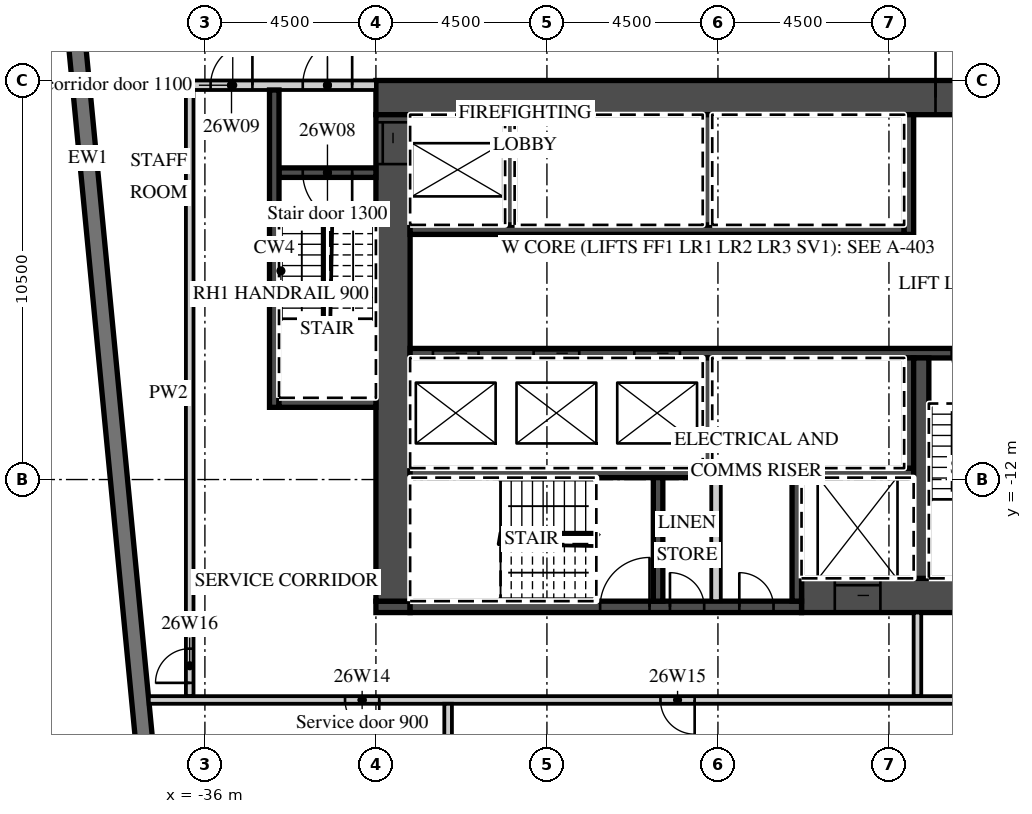
"""IFC4 building model, lengths in metres.
Left out: names, types, materials, properties, quantities, classifications, styles, units other than length and angle.
Written with IfcOpenShell. Run it as: python <this file> out.ifc"""

import sys

from ifc_helpers import new_model, si_unit, direction, frame, frame_2d, origin, place, context, subcontext, project, spatial, rectangle, extrude, element, fill, save


model = new_model("IFC4")
c1 = context("Model", 3, precision=1e-05, world=origin(), true_north=direction((0.0, 1.0)))
c2 = subcontext(c1, "Body", "Model", "MODEL_VIEW")
j1 = project(units=[si_unit("LENGTHUNIT", "METRE"), si_unit("PLANEANGLEUNIT", "RADIAN")], contexts=[c1])
p1 = place(None, origin())
s1 = spatial("IfcSite", under=j1, at=p1, CompositionType="ELEMENT")
p2 = place(p1, origin())
s2 = spatial("IfcBuilding", under=s1, at=p2, CompositionType="ELEMENT")
p3 = place(p2, frame((0.0, 0.0, 120.7)))
s3 = spatial("IfcBuildingStorey", under=s2, at=p3, CompositionType="ELEMENT", Elevation=120.7)
p4 = place(p3, frame((-40.753, 13.872, 0.0), z_axis=(0.0, 0.0, 1.0), x_axis=(0.095843327381, -0.995396431878, 0.0)))
e1 = element("IfcWall", 1, at=p4, inside=s3, PredefinedType="SOLIDWALL", context=c2, shape_type="SweptSolid", body=[
    extrude(rectangle(XDim=35.0, YDim=0.45, at=frame_2d((17.5, 0.0))), origin(), (0.0, 0.0, 1.0), 3.02),
])
p5 = place(p4, frame((4.277, 0.0, 0.45)))
e2 = element("IfcOpeningElement", 2, at=p5, cuts=e1, PredefinedType="OPENING", context=c2, shape_type="SweptSolid", body=[
    extrude(rectangle(XDim=3.3, YDim=2.25, at=frame_2d((1.65, 1.125))), frame((0.0, 0.235, 0.0), z_axis=(0.0, -1.0, 0.0), x_axis=(1.0, 0.0, 0.0)), (0.0, 0.0, 1.0), 0.47),
])
p6 = place(p4, frame((8.798, 0.0, 0.45)))
e3 = element("IfcOpeningElement", 3, at=p6, cuts=e1, PredefinedType="OPENING", context=c2, shape_type="SweptSolid", body=[
    extrude(rectangle(XDim=3.3, YDim=2.25, at=frame_2d((1.65, 1.125))), frame((0.0, 0.235, 0.0), z_axis=(0.0, -1.0, 0.0), x_axis=(1.0, 0.0, 0.0)), (0.0, 0.0, 1.0), 0.47),
])
p7 = place(p3, frame((-31.5, -1.95, 0.0), z_axis=(0.0, 0.0, 1.0), x_axis=(1.0, 0.0, 0.0)))
e4 = element("IfcWall", 4, at=p7, inside=s3, PredefinedType="SHEAR", context=c2, shape_type="SweptSolid", body=[
    extrude(rectangle(XDim=18.0, YDim=0.9, at=frame_2d((9.0, 0.0))), origin(), (0.0, 0.0, 1.0), 3.02),
])
p8 = place(p7, frame((14.725, 0.0, 0.0)))
e5 = element("IfcOpeningElement", 5, at=p8, cuts=e4, PredefinedType="OPENING", context=c2, shape_type="SweptSolid", body=[
    extrude(rectangle(XDim=1.8, YDim=2.1, at=frame_2d((0.9, 1.05))), frame((0.0, 0.46, 0.0), z_axis=(0.0, -1.0, 0.0), x_axis=(1.0, 0.0, 0.0)), (0.0, 0.0, 1.0), 0.92),
])
p9 = place(p3, frame((-20.3, -15.05, 0.0), z_axis=(0.0, 0.0, 1.0), x_axis=(1.0, 0.0, 0.0)))
e6 = element("IfcWall", 6, at=p9, inside=s3, PredefinedType="SHEAR", context=c2, shape_type="SweptSolid", body=[
    extrude(rectangle(XDim=6.8, YDim=0.9, at=frame_2d((3.4, 0.0))), origin(), (0.0, 0.0, 1.0), 3.02),
])
p10 = place(p9, frame((0.875, 0.0, 0.0)))
e7 = element("IfcOpeningElement", 7, at=p10, cuts=e6, PredefinedType="OPENING", context=c2, shape_type="SweptSolid", body=[
    extrude(rectangle(XDim=1.2, YDim=2.1, at=frame_2d((0.6, 1.05))), frame((0.0, 0.46, 0.0), z_axis=(0.0, -1.0, 0.0), x_axis=(1.0, 0.0, 0.0)), (0.0, 0.0, 1.0), 0.92),
])
p11 = place(p3, frame((-31.5, -15.35, 0.0), z_axis=(0.0, 0.0, 1.0), x_axis=(1.0, 0.0, 0.0)))
e8 = element("IfcWall", 8, at=p11, inside=s3, PredefinedType="SHEAR", context=c2, shape_type="SweptSolid", body=[
    extrude(rectangle(XDim=0.9, YDim=0.3, at=frame_2d((0.45, 0.0))), origin(), (0.0, 0.0, 1.0), 3.02),
])
p12 = place(p3, frame((-30.6, -15.35, 0.0), z_axis=(0.0, 0.0, 1.0), x_axis=(1.0, 0.0, 0.0)))
e9 = element("IfcWall", 9, at=p12, inside=s3, PredefinedType="SHEAR", context=c2, shape_type="SweptSolid", body=[
    extrude(rectangle(XDim=10.3, YDim=0.3, at=frame_2d((5.15, 0.0))), origin(), (0.0, 0.0, 1.0), 3.02),
])
p13 = place(p12, frame((5.0, 0.0, 0.0)))
e10 = element("IfcOpeningElement", 10, at=p13, cuts=e9, PredefinedType="OPENING", context=c2, shape_type="SweptSolid", body=[
    extrude(rectangle(XDim=1.3, YDim=2.1, at=frame_2d((0.65, 1.05))), frame((0.0, 0.16, 0.0), z_axis=(0.0, -1.0, 0.0), x_axis=(1.0, 0.0, 0.0)), (0.0, 0.0, 1.0), 0.32),
])
p14 = place(p12, frame((6.837, 0.0, 0.0)))
e11 = element("IfcOpeningElement", 11, at=p14, cuts=e9, PredefinedType="OPENING", context=c2, shape_type="SweptSolid", body=[
    extrude(rectangle(XDim=0.9, YDim=2.1, at=frame_2d((0.45, 1.05))), frame((0.0, 0.16, 0.0), z_axis=(0.0, -1.0, 0.0), x_axis=(1.0, 0.0, 0.0)), (0.0, 0.0, 1.0), 0.32),
])
p15 = place(p12, frame((8.663, 0.0, 0.0)))
e12 = element("IfcOpeningElement", 12, at=p15, cuts=e9, PredefinedType="OPENING", context=c2, shape_type="SweptSolid", body=[
    extrude(rectangle(XDim=0.9, YDim=2.1, at=frame_2d((0.45, 1.05))), frame((0.0, 0.16, 0.0), z_axis=(0.0, -1.0, 0.0), x_axis=(1.0, 0.0, 0.0)), (0.0, 0.0, 1.0), 0.32),
])
p16 = place(p3, frame((-31.05, -15.2, 0.0), z_axis=(0.0, 0.0, 1.0), x_axis=(0.0, 1.0, 0.0)))
e13 = element("IfcWall", 13, at=p16, inside=s3, PredefinedType="SHEAR", context=c2, shape_type="SweptSolid", body=[
    extrude(rectangle(XDim=12.8, YDim=0.9, at=frame_2d((6.4, 0.0))), origin(), (0.0, 0.0, 1.0), 3.02),
])
p17 = place(p16, frame((11.5, 0.0, 0.0)))
e14 = element("IfcOpeningElement", 14, at=p17, cuts=e13, PredefinedType="OPENING", context=c2, shape_type="SweptSolid", body=[
    extrude(rectangle(XDim=1.1, YDim=2.1, at=frame_2d((0.55, 1.05))), frame((0.0, 0.46, 0.0), z_axis=(0.0, -1.0, 0.0), x_axis=(1.0, 0.0, 0.0)), (0.0, 0.0, 1.0), 0.92),
])
p18 = place(p3, frame((-30.6, -5.425, 0.0), z_axis=(0.0, 0.0, 1.0), x_axis=(1.0, 0.0, 0.0)))
e15 = element("IfcWall", 15, at=p18, inside=s3, PredefinedType="SHEAR", context=c2, shape_type="SweptSolid", body=[
    extrude(rectangle(XDim=13.0, YDim=0.25, at=frame_2d((6.5, 0.0))), origin(), (0.0, 0.0, 1.0), 3.02),
])
p19 = place(p3, frame((-17.475, -5.55, 0.0), z_axis=(0.0, 0.0, 1.0), x_axis=(0.0, 1.0, 0.0)))
e16 = element("IfcWall", 16, at=p19, inside=s3, PredefinedType="SHEAR", context=c2, shape_type="SweptSolid", body=[
    extrude(rectangle(XDim=3.15, YDim=0.25, at=frame_2d((1.575, 0.0))), origin(), (0.0, 0.0, 1.0), 3.02),
])
for number, where, z_axis, x_axis in (
    (17, (-27.975, -5.3, 0.0), (0.0, 0.0, 1.0), (0.0, 1.0, 0.0)),
    (18, (-22.775, -5.3, 0.0), (0.0, 0.0, 1.0), (0.0, 1.0, 0.0)),
):
    element("IfcWall", number, at=place(p3, frame(where, z_axis=z_axis, x_axis=x_axis)), inside=s3, PredefinedType="SHEAR", context=c2, shape_type="SweptSolid", body=[
        extrude(rectangle(XDim=2.9, YDim=0.25, at=frame_2d((1.45, 0.0))), origin(), (0.0, 0.0, 1.0), 3.02),
    ])
p20 = place(p3, frame((-30.6, -8.675, 0.0), z_axis=(0.0, 0.0, 1.0), x_axis=(1.0, 0.0, 0.0)))
e19 = element("IfcWall", 19, at=p20, inside=s3, PredefinedType="SHEAR", context=c2, shape_type="SweptSolid", body=[
    extrude(rectangle(XDim=16.2, YDim=0.25, at=frame_2d((8.1, 0.0))), origin(), (0.0, 0.0, 1.0), 3.02),
])
p21 = place(p20, frame((0.6, 0.0, 0.0)))
e20 = element("IfcOpeningElement", 20, at=p21, cuts=e19, PredefinedType="OPENING", context=c2, shape_type="SweptSolid", body=[
    extrude(rectangle(XDim=1.2, YDim=2.1, at=frame_2d((0.6, 1.05))), frame((0.0, 0.135, 0.0), z_axis=(0.0, -1.0, 0.0), x_axis=(1.0, 0.0, 0.0)), (0.0, 0.0, 1.0), 0.27),
])
p22 = place(p20, frame((3.25, 0.0, 0.0)))
e21 = element("IfcOpeningElement", 21, at=p22, cuts=e19, PredefinedType="OPENING", context=c2, shape_type="SweptSolid", body=[
    extrude(rectangle(XDim=1.2, YDim=2.1, at=frame_2d((0.6, 1.05))), frame((0.0, 0.135, 0.0), z_axis=(0.0, -1.0, 0.0), x_axis=(1.0, 0.0, 0.0)), (0.0, 0.0, 1.0), 0.27),
])
p23 = place(p20, frame((5.9, 0.0, 0.0)))
e22 = element("IfcOpeningElement", 22, at=p23, cuts=e19, PredefinedType="OPENING", context=c2, shape_type="SweptSolid", body=[
    extrude(rectangle(XDim=1.2, YDim=2.1, at=frame_2d((0.6, 1.05))), frame((0.0, 0.135, 0.0), z_axis=(0.0, -1.0, 0.0), x_axis=(1.0, 0.0, 0.0)), (0.0, 0.0, 1.0), 0.27),
])
p24 = place(p20, frame((14.25, 0.0, 0.0)))
e23 = element("IfcOpeningElement", 23, at=p24, cuts=e19, PredefinedType="OPENING", context=c2, shape_type="SweptSolid", body=[
    extrude(rectangle(XDim=1.3, YDim=2.1, at=frame_2d((0.65, 1.05))), frame((0.0, 0.135, 0.0), z_axis=(0.0, -1.0, 0.0), x_axis=(1.0, 0.0, 0.0)), (0.0, 0.0, 1.0), 0.27),
])
p25 = place(p3, frame((-30.6, -11.825, 0.0), z_axis=(0.0, 0.0, 1.0), x_axis=(1.0, 0.0, 0.0)))
e24 = element("IfcWall", 24, at=p25, inside=s3, PredefinedType="SHEAR", context=c2, shape_type="SweptSolid", body=[
    extrude(rectangle(XDim=13.25, YDim=0.25, at=frame_2d((6.625, 0.0))), origin(), (0.0, 0.0, 1.0), 3.02),
])
for number, where, z_axis, x_axis in (
    (25, (-17.475, -11.7, 0.0), (0.0, 0.0, 1.0), (0.0, 1.0, 0.0)),
    (26, (-22.775, -11.7, 0.0), (0.0, 0.0, 1.0), (0.0, 1.0, 0.0)),
):
    element("IfcWall", number, at=place(p3, frame(where, z_axis=z_axis, x_axis=x_axis)), inside=s3, PredefinedType="SHEAR", context=c2, shape_type="SweptSolid", body=[
        extrude(rectangle(XDim=2.9, YDim=0.25, at=frame_2d((1.45, 0.0))), origin(), (0.0, 0.0, 1.0), 3.02),
    ])
p26 = place(p3, frame((-17.15, -14.6, 0.0), z_axis=(0.0, 0.0, 1.0), x_axis=(0.0, 1.0, 0.0)))
e27 = element("IfcWall", 27, at=p26, inside=s3, PredefinedType="SHEAR", context=c2, shape_type="SweptSolid", body=[
    extrude(rectangle(XDim=5.8, YDim=0.4, at=frame_2d((2.9, 0.0))), origin(), (0.0, 0.0, 1.0), 3.02),
])
for number, where, z_axis, x_axis in (
    (28, (-20.425, -15.2, 0.0), (0.0, 0.0, 1.0), (0.0, 1.0, 0.0)),
    (29, (-24.075, -15.2, 0.0), (0.0, 0.0, 1.0), (0.0, 1.0, 0.0)),
):
    element("IfcWall", number, at=place(p3, frame(where, z_axis=z_axis, x_axis=x_axis)), inside=s3, PredefinedType="SHEAR", context=c2, shape_type="SweptSolid", body=[
        extrude(rectangle(XDim=3.25, YDim=0.25, at=frame_2d((1.625, 0.0))), origin(), (0.0, 0.0, 1.0), 3.02),
    ])
p27 = place(p3, frame((-22.55, -15.2, 0.0), z_axis=(0.0, 0.0, 1.0), x_axis=(0.0, 1.0, 0.0)))
e30 = element("IfcWall", 30, at=p27, inside=s3, PredefinedType="PARTITIONING", context=c2, shape_type="SweptSolid", body=[
    extrude(rectangle(XDim=3.25, YDim=0.25, at=frame_2d((1.625, 0.0))), origin(), (0.0, 0.0, 1.0), 3.02),
])
p28 = place(p3, frame((-39.035, -1.625, 0.0), z_axis=(0.0, 0.0, 1.0), x_axis=(1.0, 0.0, 0.0)))
e31 = element("IfcWall", 31, at=p28, inside=s3, PredefinedType="PARTITIONING", context=c2, shape_type="SweptSolid", body=[
    extrude(rectangle(XDim=7.535, YDim=0.25, at=frame_2d((3.768, 0.0))), origin(), (0.0, 0.0, 1.0), 3.02),
])
p29 = place(p28, frame((5.61, 0.0, 0.0)))
e32 = element("IfcOpeningElement", 32, at=p29, cuts=e31, PredefinedType="OPENING", context=c2, shape_type="SweptSolid", body=[
    extrude(rectangle(XDim=1.3, YDim=2.1, at=frame_2d((0.65, 1.05))), frame((0.0, 0.135, 0.0), z_axis=(0.0, -1.0, 0.0), x_axis=(1.0, 0.0, 0.0)), (0.0, 0.0, 1.0), 0.27),
])
p30 = place(p28, frame((3.185, 0.0, 0.0)))
e33 = element("IfcOpeningElement", 33, at=p30, cuts=e31, PredefinedType="OPENING", context=c2, shape_type="SweptSolid", body=[
    extrude(rectangle(XDim=1.1, YDim=2.1, at=frame_2d((0.55, 1.05))), frame((0.0, 0.135, 0.0), z_axis=(0.0, -1.0, 0.0), x_axis=(1.0, 0.0, 0.0)), (0.0, 0.0, 1.0), 0.27),
])
p31 = place(p3, frame((-34.05, -3.925, 0.0), z_axis=(0.0, 0.0, 1.0), x_axis=(1.0, 0.0, 0.0)))
e34 = element("IfcWall", 34, at=p31, inside=s3, PredefinedType="SHEAR", context=c2, shape_type="SweptSolid", body=[
    extrude(rectangle(XDim=2.55, YDim=0.25, at=frame_2d((1.275, 0.0))), origin(), (0.0, 0.0, 1.0), 3.02),
])
p32 = place(p31, frame((0.625, 0.0, 0.0)))
e35 = element("IfcOpeningElement", 35, at=p32, cuts=e34, PredefinedType="OPENING", context=c2, shape_type="SweptSolid", body=[
    extrude(rectangle(XDim=1.3, YDim=2.1, at=frame_2d((0.65, 1.05))), frame((0.0, 0.135, 0.0), z_axis=(0.0, -1.0, 0.0), x_axis=(1.0, 0.0, 0.0)), (0.0, 0.0, 1.0), 0.27),
])
p33 = place(p3, frame((-34.175, -10.1, 0.0), z_axis=(0.0, 0.0, 1.0), x_axis=(0.0, 1.0, 0.0)))
e36 = element("IfcWall", 36, at=p33, inside=s3, PredefinedType="SHEAR", context=c2, shape_type="SweptSolid", body=[
    extrude(rectangle(XDim=8.35, YDim=0.25, at=frame_2d((4.175, 0.0))), origin(), (0.0, 0.0, 1.0), 3.02),
])
p34 = place(p3, frame((-34.05, -9.975, 0.0), z_axis=(0.0, 0.0, 1.0), x_axis=(1.0, 0.0, 0.0)))
e37 = element("IfcWall", 37, at=p34, inside=s3, PredefinedType="SHEAR", context=c2, shape_type="SweptSolid", body=[
    extrude(rectangle(XDim=2.55, YDim=0.25, at=frame_2d((1.275, 0.0))), origin(), (0.0, 0.0, 1.0), 3.02),
])
p35 = place(p3, frame((-17.25, -17.7, 0.0), z_axis=(0.0, 0.0, 1.0), x_axis=(0.0, 1.0, 0.0)))
e38 = element("IfcWall", 38, at=p35, inside=s3, PredefinedType="PARTITIONING", context=c2, shape_type="SweptSolid", body=[
    extrude(rectangle(XDim=2.2, YDim=0.2, at=frame_2d((1.1, 0.0))), origin(), (0.0, 0.0, 1.0), 3.02),
])
p36 = place(p3, frame((-36.4, -17.7, 0.0), z_axis=(0.0, 0.0, 1.0), x_axis=(0.0, 1.0, 0.0)))
e39 = element("IfcWall", 39, at=p36, inside=s3, PredefinedType="PARTITIONING", context=c2, shape_type="SweptSolid", body=[
    extrude(rectangle(XDim=15.95, YDim=0.2, at=frame_2d((7.975, 0.0))), origin(), (0.0, 0.0, 1.0), 3.02),
])
p37 = place(p36, frame((0.35, 0.0, 0.0)))
e40 = element("IfcOpeningElement", 40, at=p37, cuts=e39, PredefinedType="OPENING", context=c2, shape_type="SweptSolid", body=[
    extrude(rectangle(XDim=0.9, YDim=2.1, at=frame_2d((0.45, 1.05))), frame((0.0, 0.11, 0.0), z_axis=(0.0, -1.0, 0.0), x_axis=(1.0, 0.0, 0.0)), (0.0, 0.0, 1.0), 0.22),
])
p38 = place(p3, frame((-37.477, -17.8, 0.0), z_axis=(0.0, 0.0, 1.0), x_axis=(1.0, 0.0, 0.0)))
e41 = element("IfcWall", 41, at=p38, inside=s3, PredefinedType="PARTITIONING", context=c2, shape_type="SweptSolid", body=[
    extrude(rectangle(XDim=23.877, YDim=0.2, at=frame_2d((11.938, 0.0))), origin(), (0.0, 0.0, 1.0), 3.02),
])
p39 = place(p38, frame((5.165, 0.0, 0.0)))
e42 = element("IfcOpeningElement", 42, at=p39, cuts=e41, PredefinedType="OPENING", context=c2, shape_type="SweptSolid", body=[
    extrude(rectangle(XDim=0.9, YDim=2.1, at=frame_2d((0.45, 1.05))), frame((0.0, 0.11, 0.0), z_axis=(0.0, -1.0, 0.0), x_axis=(1.0, 0.0, 0.0)), (0.0, 0.0, 1.0), 0.22),
])
p40 = place(p38, frame((13.465, 0.0, 0.0)))
e43 = element("IfcOpeningElement", 43, at=p40, cuts=e41, PredefinedType="OPENING", context=c2, shape_type="SweptSolid", body=[
    extrude(rectangle(XDim=0.9, YDim=2.1, at=frame_2d((0.45, 1.05))), frame((0.0, 0.11, 0.0), z_axis=(0.0, -1.0, 0.0), x_axis=(1.0, 0.0, 0.0)), (0.0, 0.0, 1.0), 0.22),
])
p41 = place(p3, frame((-29.6, -23.784, 0.0), z_axis=(0.0, 0.0, 1.0), x_axis=(0.0, 1.0, 0.0)))
e44 = element("IfcWall", 44, at=p41, inside=s3, PredefinedType="PARTITIONING", context=c2, shape_type="SweptSolid", body=[
    extrude(rectangle(XDim=5.884, YDim=0.2, at=frame_2d((2.942, 0.0))), origin(), (0.0, 0.0, 1.0), 3.02),
])
p42 = place(p21, origin())
e45 = element("IfcDoor", 45, at=p42, inside=s3, OperationType="SLIDING_TO_LEFT", PredefinedType="DOOR", context=c2, shape_type="SweptSolid", body=[
    extrude(rectangle(XDim=1.2, YDim=2.1, at=frame_2d((0.6, 1.05))), frame((0.0, 0.025, 0.0), z_axis=(0.0, -1.0, 0.0), x_axis=(1.0, 0.0, 0.0)), (0.0, 0.0, 1.0), 0.05),
])
fill(e20, e45)
p43 = place(p22, origin())
e46 = element("IfcDoor", 46, at=p43, inside=s3, OperationType="SLIDING_TO_RIGHT", PredefinedType="DOOR", context=c2, shape_type="SweptSolid", body=[
    extrude(rectangle(XDim=1.2, YDim=2.1, at=frame_2d((0.6, 1.05))), frame((0.0, 0.025, 0.0), z_axis=(0.0, -1.0, 0.0), x_axis=(1.0, 0.0, 0.0)), (0.0, 0.0, 1.0), 0.05),
])
fill(e21, e46)
p44 = place(p23, origin())
e47 = element("IfcDoor", 47, at=p44, inside=s3, OperationType="SLIDING_TO_RIGHT", PredefinedType="DOOR", context=c2, shape_type="SweptSolid", body=[
    extrude(rectangle(XDim=1.2, YDim=2.1, at=frame_2d((0.6, 1.05))), frame((0.0, 0.025, 0.0), z_axis=(0.0, -1.0, 0.0), x_axis=(1.0, 0.0, 0.0)), (0.0, 0.0, 1.0), 0.05),
])
fill(e22, e47)
p45 = place(p10, origin())
e48 = element("IfcDoor", 48, at=p45, inside=s3, OperationType="SLIDING_TO_LEFT", PredefinedType="DOOR", context=c2, shape_type="SweptSolid", body=[
    extrude(rectangle(XDim=1.2, YDim=2.1, at=frame_2d((0.6, 1.05))), frame((0.0, 0.025, 0.0), z_axis=(0.0, -1.0, 0.0), x_axis=(1.0, 0.0, 0.0)), (0.0, 0.0, 1.0), 0.05),
])
fill(e7, e48)
p46 = place(p17, origin())
e49 = element("IfcDoor", 49, at=p46, inside=s3, OperationType="SLIDING_TO_RIGHT", PredefinedType="DOOR", context=c2, shape_type="SweptSolid", body=[
    extrude(rectangle(XDim=1.1, YDim=2.1, at=frame_2d((0.55, 1.05))), frame((0.0, 0.025, 0.0), z_axis=(0.0, -1.0, 0.0), x_axis=(1.0, 0.0, 0.0)), (0.0, 0.0, 1.0), 0.05),
])
fill(e14, e49)
p47 = place(p8, origin())
e50 = element("IfcDoor", 50, at=p47, inside=s3, OperationType="DOUBLE_DOOR_DOUBLE_SWING", PredefinedType="DOOR", context=c2, shape_type="SweptSolid", body=[
    extrude(rectangle(XDim=1.8, YDim=2.1, at=frame_2d((0.9, 1.05))), frame((0.0, 0.025, 0.0), z_axis=(0.0, -1.0, 0.0), x_axis=(1.0, 0.0, 0.0)), (0.0, 0.0, 1.0), 0.05),
])
fill(e5, e50)
p48 = place(p29, origin())
e51 = element("IfcDoor", 51, at=p48, inside=s3, OperationType="SINGLE_SWING_RIGHT", PredefinedType="DOOR", context=c2, shape_type="SweptSolid", body=[
    extrude(rectangle(XDim=1.3, YDim=2.1, at=frame_2d((0.65, 1.05))), frame((0.0, 0.025, 0.0), z_axis=(0.0, -1.0, 0.0), x_axis=(1.0, 0.0, 0.0)), (0.0, 0.0, 1.0), 0.05),
])
fill(e32, e51)
p49 = place(p32, origin())
e52 = element("IfcDoor", 52, at=p49, inside=s3, OperationType="SINGLE_SWING_RIGHT", PredefinedType="DOOR", context=c2, shape_type="SweptSolid", body=[
    extrude(rectangle(XDim=1.3, YDim=2.1, at=frame_2d((0.65, 1.05))), frame((0.0, 0.025, 0.0), z_axis=(0.0, -1.0, 0.0), x_axis=(1.0, 0.0, 0.0)), (0.0, 0.0, 1.0), 0.05),
])
fill(e35, e52)
p50 = place(p30, origin())
e53 = element("IfcDoor", 53, at=p50, inside=s3, OperationType="SINGLE_SWING_RIGHT", PredefinedType="DOOR", context=c2, shape_type="SweptSolid", body=[
    extrude(rectangle(XDim=1.1, YDim=2.1, at=frame_2d((0.55, 1.05))), frame((0.0, 0.025, 0.0), z_axis=(0.0, -1.0, 0.0), x_axis=(1.0, 0.0, 0.0)), (0.0, 0.0, 1.0), 0.05),
])
fill(e33, e53)
p51 = place(p24, origin())
e54 = element("IfcDoor", 54, at=p51, inside=s3, OperationType="SINGLE_SWING_RIGHT", PredefinedType="DOOR", context=c2, shape_type="SweptSolid", body=[
    extrude(rectangle(XDim=1.3, YDim=2.1, at=frame_2d((0.65, 1.05))), frame((0.0, 0.025, 0.0), z_axis=(0.0, -1.0, 0.0), x_axis=(1.0, 0.0, 0.0)), (0.0, 0.0, 1.0), 0.05),
])
fill(e23, e54)
p52 = place(p13, origin())
e55 = element("IfcDoor", 55, at=p52, inside=s3, OperationType="SINGLE_SWING_RIGHT", PredefinedType="DOOR", context=c2, shape_type="SweptSolid", body=[
    extrude(rectangle(XDim=1.3, YDim=2.1, at=frame_2d((0.65, 1.05))), frame((0.0, 0.025, 0.0), z_axis=(0.0, -1.0, 0.0), x_axis=(1.0, 0.0, 0.0)), (0.0, 0.0, 1.0), 0.05),
])
fill(e10, e55)
p53 = place(p14, origin())
e56 = element("IfcDoor", 56, at=p53, inside=s3, OperationType="SINGLE_SWING_LEFT", PredefinedType="DOOR", context=c2, shape_type="SweptSolid", body=[
    extrude(rectangle(XDim=0.9, YDim=2.1, at=frame_2d((0.45, 1.05))), frame((0.0, 0.025, 0.0), z_axis=(0.0, -1.0, 0.0), x_axis=(1.0, 0.0, 0.0)), (0.0, 0.0, 1.0), 0.05),
])
fill(e11, e56)
p54 = place(p15, origin())
e57 = element("IfcDoor", 57, at=p54, inside=s3, OperationType="SINGLE_SWING_LEFT", PredefinedType="DOOR", context=c2, shape_type="SweptSolid", body=[
    extrude(rectangle(XDim=0.9, YDim=2.1, at=frame_2d((0.45, 1.05))), frame((0.0, 0.025, 0.0), z_axis=(0.0, -1.0, 0.0), x_axis=(1.0, 0.0, 0.0)), (0.0, 0.0, 1.0), 0.05),
])
fill(e12, e57)
p55 = place(p39, origin())
e58 = element("IfcDoor", 58, at=p55, inside=s3, OperationType="SINGLE_SWING_RIGHT", PredefinedType="DOOR", context=c2, shape_type="SweptSolid", body=[
    extrude(rectangle(XDim=0.9, YDim=2.1, at=frame_2d((0.45, 1.05))), frame((0.0, 0.025, 0.0), z_axis=(0.0, -1.0, 0.0), x_axis=(1.0, 0.0, 0.0)), (0.0, 0.0, 1.0), 0.05),
])
fill(e42, e58)
p56 = place(p40, origin())
e59 = element("IfcDoor", 59, at=p56, inside=s3, OperationType="SINGLE_SWING_RIGHT", PredefinedType="DOOR", context=c2, shape_type="SweptSolid", body=[
    extrude(rectangle(XDim=0.9, YDim=2.1, at=frame_2d((0.45, 1.05))), frame((0.0, 0.025, 0.0), z_axis=(0.0, -1.0, 0.0), x_axis=(1.0, 0.0, 0.0)), (0.0, 0.0, 1.0), 0.05),
])
fill(e43, e59)
p57 = place(p37, origin())
e60 = element("IfcDoor", 60, at=p57, inside=s3, OperationType="SINGLE_SWING_LEFT", PredefinedType="DOOR", context=c2, shape_type="SweptSolid", body=[
    extrude(rectangle(XDim=0.9, YDim=2.1, at=frame_2d((0.45, 1.05))), frame((0.0, 0.025, 0.0), z_axis=(0.0, -1.0, 0.0), x_axis=(1.0, 0.0, 0.0)), (0.0, 0.0, 1.0), 0.05),
])
fill(e40, e60)
save(model, sys.argv[1])
